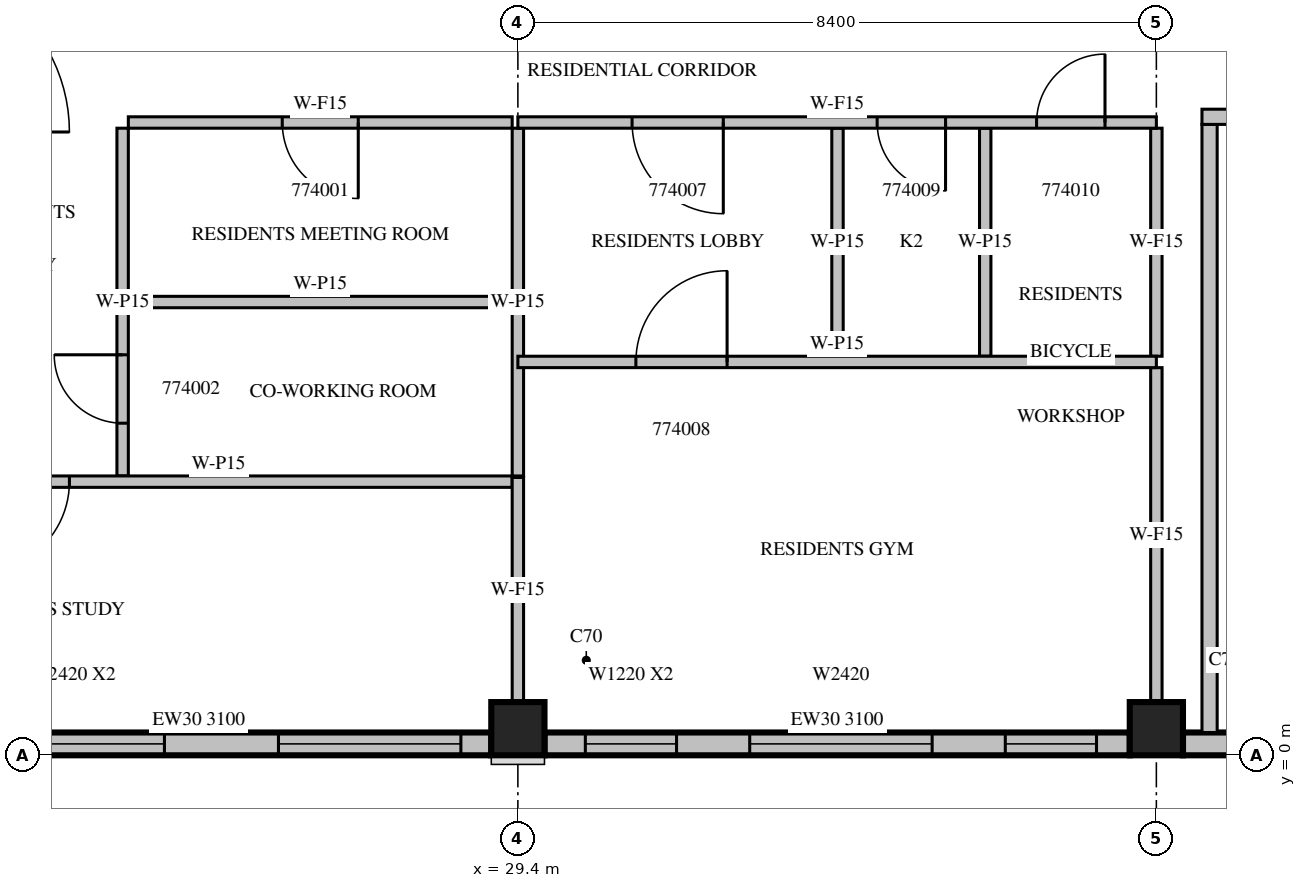
"""IFC4 building model, lengths in metres.
Left out: names, types, materials, properties, quantities, classifications, styles, units other than length and angle.
Written with IfcOpenShell. Run it as: python <this file> out.ifc"""

import sys

from ifc_helpers import new_model, si_unit, direction, frame, frame_2d, origin, origin_2d, place, context, subcontext, project, spatial, rectangle, extrude, source, transform, mapped, element, fill, save


model = new_model("IFC4")
c1 = context("Model", 3, precision=1e-05, world=origin(), true_north=direction((0.0, 1.0)))
c2 = subcontext(c1, "Body", "Model", "MODEL_VIEW")
j1 = project(units=[si_unit("LENGTHUNIT", "METRE"), si_unit("PLANEANGLEUNIT", "RADIAN")], contexts=[c1])
p1 = place(None, origin())
s1 = spatial("IfcSite", under=j1, at=p1, CompositionType="ELEMENT")
p2 = place(p1, origin())
s2 = spatial("IfcBuilding", under=s1, at=p2, CompositionType="ELEMENT")
p3 = place(p2, frame((0.0, 0.0, 319.5)))
s3 = spatial("IfcBuildingStorey", under=s2, at=p3, CompositionType="ELEMENT", Elevation=319.5)
m1 = source(origin(), c2, "Body", "SweptSolid", [
    extrude(rectangle(XDim=0.7, YDim=0.7, at=origin_2d()), origin(), (0.0, 0.0, 1.0), 3.5),
])
for number, where, z_axis, x_axis in (
    (1, (29.4, 0.35, 0.0), (0.0, 0.0, 1.0), (1.0, 0.0, 0.0)),
    (2, (37.8, 0.35, 0.0), (0.0, 0.0, 1.0), (1.0, 0.0, 0.0)),
):
    element("IfcColumn", number, at=place(p3, frame(where, z_axis=z_axis, x_axis=x_axis)), inside=s3, PredefinedType="COLUMN", context=c2, shape_type="MappedRepresentation", body=[
        mapped(m1, transform((0.0, 0.0, 0.0), scale=1.0)),
    ])
m2 = source(origin(), c2, "Body", "SweptSolid", [
    extrude(rectangle(XDim=7.7, YDim=0.3, at=frame_2d((3.85, 0.0))), origin(), (0.0, 0.0, 1.0), 3.1),
])
p4 = place(p3, frame((21.35, 0.15, 0.0), z_axis=(0.0, 0.0, 1.0), x_axis=(1.0, 0.0, 0.0)))
e3 = element("IfcWall", 3, at=p4, inside=s3, PredefinedType="STANDARD", context=c2, shape_type="MappedRepresentation", body=[
    mapped(m2, transform((0.0, 0.0, 0.0), scale=1.0)),
])
m3 = source(origin(), c2, "Body", "SweptSolid", [
    extrude(rectangle(XDim=2.4, YDim=2.0, at=frame_2d((1.2, 1.0))), frame((0.0, 0.16, 0.0), z_axis=(0.0, -1.0, 0.0), x_axis=(1.0, 0.0, 0.0)), (0.0, 0.0, 1.0), 0.32),
])
p5 = place(p4, frame((1.0, 0.0, 0.6)))
e4 = element("IfcOpeningElement", 4, at=p5, cuts=e3, PredefinedType="OPENING", context=c2, shape_type="MappedRepresentation", body=[
    mapped(m3, transform((0.0, 0.0, 0.0), scale=1.0)),
])
p6 = place(p4, frame((4.9, 0.0, 0.6)))
e5 = element("IfcOpeningElement", 5, at=p6, cuts=e3, PredefinedType="OPENING", context=c2, shape_type="MappedRepresentation", body=[
    mapped(m3, transform((0.0, 0.0, 0.0), scale=1.0)),
])
p7 = place(p3, frame((29.75, 0.15, 0.0), z_axis=(0.0, 0.0, 1.0), x_axis=(1.0, 0.0, 0.0)))
e6 = element("IfcWall", 6, at=p7, inside=s3, PredefinedType="STANDARD", context=c2, shape_type="MappedRepresentation", body=[
    mapped(m2, transform((0.0, 0.0, 0.0), scale=1.0)),
])
m4 = source(origin(), c2, "Body", "SweptSolid", [
    extrude(rectangle(XDim=1.2, YDim=2.0, at=frame_2d((0.6, 1.0))), frame((0.0, 0.16, 0.0), z_axis=(0.0, -1.0, 0.0), x_axis=(1.0, 0.0, 0.0)), (0.0, 0.0, 1.0), 0.32),
])
p8 = place(p7, frame((0.537, 0.0, 0.6)))
e7 = element("IfcOpeningElement", 7, at=p8, cuts=e6, PredefinedType="OPENING", context=c2, shape_type="MappedRepresentation", body=[
    mapped(m4, transform((0.0, 0.0, 0.0), scale=1.0)),
])
p9 = place(p7, frame((6.062, 0.0, 0.6)))
e8 = element("IfcOpeningElement", 8, at=p9, cuts=e6, PredefinedType="OPENING", context=c2, shape_type="MappedRepresentation", body=[
    mapped(m4, transform((0.0, 0.0, 0.0), scale=1.0)),
])
p10 = place(p7, frame((2.7, 0.0, 0.6)))
e9 = element("IfcOpeningElement", 9, at=p10, cuts=e6, PredefinedType="OPENING", context=c2, shape_type="MappedRepresentation", body=[
    mapped(m3, transform((0.0, 0.0, 0.0), scale=1.0)),
])
m5 = source(origin(), c2, "Body", "SweptSolid", [
    extrude(rectangle(XDim=2.05, YDim=0.3, at=frame_2d((1.025, 0.0))), origin(), (0.0, 0.0, 1.0), 3.1),
])
p11 = place(p3, frame((38.15, 0.15, 0.0), z_axis=(0.0, 0.0, 1.0), x_axis=(1.0, 0.0, 0.0)))
e10 = element("IfcWall", 10, at=p11, inside=s3, PredefinedType="STANDARD", context=c2, shape_type="MappedRepresentation", body=[
    mapped(m5, transform((0.0, 0.0, 0.0), scale=1.0)),
])
m6 = source(origin(), c2, "Body", "SweptSolid", [
    extrude(rectangle(XDim=8.0, YDim=0.2, at=frame_2d((4.0, 0.0))), origin(), (0.0, 0.0, 1.0), 3.1),
])
p12 = place(p3, frame((38.5, 0.3, 0.0), z_axis=(0.0, 0.0, 1.0), x_axis=(0.0, 1.0, 0.0)))
e11 = element("IfcWall", 11, at=p12, inside=s3, PredefinedType="PARTITIONING", context=c2, shape_type="MappedRepresentation", body=[
    mapped(m6, transform((0.0, 0.0, 0.0), scale=1.0)),
])
m7 = source(origin(), c2, "Body", "SweptSolid", [
    extrude(rectangle(XDim=5.45, YDim=0.2, at=frame_2d((2.725, 0.0))), origin(), (0.0, 0.0, 1.0), 3.1),
])
p13 = place(p3, frame((38.4, 8.4, 0.0), z_axis=(0.0, 0.0, 1.0), x_axis=(1.0, 0.0, 0.0)))
e12 = element("IfcWall", 12, at=p13, inside=s3, PredefinedType="PARTITIONING", context=c2, shape_type="MappedRepresentation", body=[
    mapped(m7, transform((0.0, 0.0, 0.0), scale=1.0)),
])
m8 = source(origin(), c2, "Body", "SweptSolid", [
    extrude(rectangle(XDim=1.2, YDim=2.1, at=frame_2d((0.6, 1.05))), frame((0.0, 0.11, 0.0), z_axis=(0.0, -1.0, 0.0), x_axis=(1.0, 0.0, 0.0)), (0.0, 0.0, 1.0), 0.22),
])
p14 = place(p13, frame((0.4, 0.0, 0.0)))
e13 = element("IfcOpeningElement", 13, at=p14, cuts=e12, PredefinedType="OPENING", context=c2, shape_type="MappedRepresentation", body=[
    mapped(m8, transform((0.0, 0.0, 0.0), scale=1.0)),
])
m9 = source(origin(), c2, "Body", "SweptSolid", [
    extrude(rectangle(XDim=0.9, YDim=2.1, at=frame_2d((0.45, 1.05))), frame((0.0, 0.11, 0.0), z_axis=(0.0, -1.0, 0.0), x_axis=(1.0, 0.0, 0.0)), (0.0, 0.0, 1.0), 0.22),
])
p15 = place(p13, frame((3.25, 0.0, 0.0)))
e14 = element("IfcOpeningElement", 14, at=p15, cuts=e12, PredefinedType="OPENING", context=c2, shape_type="MappedRepresentation", body=[
    mapped(m9, transform((0.0, 0.0, 0.0), scale=1.0)),
])
m10 = source(origin(), c2, "Body", "SweptSolid", [
    extrude(rectangle(XDim=4.575, YDim=0.15, at=frame_2d((2.288, 0.0))), origin(), (0.0, 0.0, 1.0), 3.1),
])
p16 = place(p3, frame((24.2, 8.25, 0.0), z_axis=(0.0, 0.0, 1.0), x_axis=(0.0, -1.0, 0.0)))
e15 = element("IfcWall", 15, at=p16, inside=s3, PredefinedType="PARTITIONING", context=c2, shape_type="MappedRepresentation", body=[
    mapped(m10, transform((0.0, 0.0, 0.0), scale=1.0)),
])
m11 = source(origin(), c2, "Body", "SweptSolid", [
    extrude(rectangle(XDim=0.9, YDim=2.1, at=frame_2d((0.45, 1.05))), frame((0.0, 0.085, 0.0), z_axis=(0.0, -1.0, 0.0), x_axis=(1.0, 0.0, 0.0)), (0.0, 0.0, 1.0), 0.17),
])
p17 = place(p16, frame((2.981, 0.0, 0.0)))
e16 = element("IfcOpeningElement", 16, at=p17, cuts=e15, PredefinedType="OPENING", context=c2, shape_type="MappedRepresentation", body=[
    mapped(m11, transform((0.0, 0.0, 0.0), scale=1.0)),
])
p18 = place(p3, frame((29.4, 3.675, 0.0), z_axis=(0.0, 0.0, 1.0), x_axis=(0.0, 1.0, 0.0)))
e17 = element("IfcWall", 17, at=p18, inside=s3, PredefinedType="PARTITIONING", context=c2, shape_type="MappedRepresentation", body=[
    mapped(m10, transform((0.0, 0.0, 0.0), scale=1.0)),
])
m12 = source(origin(), c2, "Body", "SweptSolid", [
    extrude(rectangle(XDim=5.05, YDim=0.15, at=frame_2d((2.525, 0.0))), origin(), (0.0, 0.0, 1.0), 3.1),
])
p19 = place(p3, frame((29.325, 8.325, 0.0), z_axis=(0.0, 0.0, 1.0), x_axis=(-1.0, 0.0, 0.0)))
e18 = element("IfcWall", 18, at=p19, inside=s3, PredefinedType="PARTITIONING", context=c2, shape_type="MappedRepresentation", body=[
    mapped(m12, transform((0.0, 0.0, 0.0), scale=1.0)),
])
m13 = source(origin(), c2, "Body", "SweptSolid", [
    extrude(rectangle(XDim=1.0, YDim=2.1, at=frame_2d((0.5, 1.05))), frame((0.0, 0.085, 0.0), z_axis=(0.0, -1.0, 0.0), x_axis=(1.0, 0.0, 0.0)), (0.0, 0.0, 1.0), 0.17),
])
p20 = place(p19, frame((2.025, 0.0, 0.0)))
e19 = element("IfcOpeningElement", 19, at=p20, cuts=e18, PredefinedType="OPENING", context=c2, shape_type="MappedRepresentation", body=[
    mapped(m13, transform((0.0, 0.0, 0.0), scale=1.0)),
])
p21 = place(p3, frame((29.325, 5.963, 0.0), z_axis=(0.0, 0.0, 1.0), x_axis=(-1.0, 0.0, 0.0)))
e20 = element("IfcWall", 20, at=p21, inside=s3, PredefinedType="PARTITIONING", context=c2, shape_type="MappedRepresentation", body=[
    mapped(m12, transform((0.0, 0.0, 0.0), scale=1.0)),
])
m14 = source(origin(), c2, "Body", "SweptSolid", [
    extrude(rectangle(XDim=7.725, YDim=0.15, at=frame_2d((3.862, 0.0))), origin(), (0.0, 0.0, 1.0), 3.1),
])
p22 = place(p3, frame((21.6, 3.6, 0.0), z_axis=(0.0, 0.0, 1.0), x_axis=(1.0, 0.0, 0.0)))
e21 = element("IfcWall", 21, at=p22, inside=s3, PredefinedType="PARTITIONING", context=c2, shape_type="MappedRepresentation", body=[
    mapped(m14, transform((0.0, 0.0, 0.0), scale=1.0)),
])
m15 = source(origin(), c2, "Body", "SweptSolid", [
    extrude(rectangle(XDim=1.2, YDim=2.1, at=frame_2d((0.6, 1.05))), frame((0.0, 0.085, 0.0), z_axis=(0.0, -1.0, 0.0), x_axis=(1.0, 0.0, 0.0)), (0.0, 0.0, 1.0), 0.17),
])
p23 = place(p22, frame((0.7, 0.0, 0.0)))
e22 = element("IfcOpeningElement", 22, at=p23, cuts=e21, PredefinedType="OPENING", context=c2, shape_type="MappedRepresentation", body=[
    mapped(m15, transform((0.0, 0.0, 0.0), scale=1.0)),
])
m16 = source(origin(), c2, "Body", "SweptSolid", [
    extrude(rectangle(XDim=3.0, YDim=0.15, at=frame_2d((1.5, 0.0))), origin(), (0.0, 0.0, 1.0), 3.1),
])
for number, where, z_axis, x_axis in (
    (23, (33.605, 5.25, 0.0), (0.0, 0.0, 1.0), (0.0, 1.0, 0.0)),
    (24, (35.548, 5.25, 0.0), (0.0, 0.0, 1.0), (0.0, 1.0, 0.0)),
):
    element("IfcWall", number, at=place(p3, frame(where, z_axis=z_axis, x_axis=x_axis)), inside=s3, PredefinedType="PARTITIONING", context=c2, shape_type="MappedRepresentation", body=[
        mapped(m16, transform((0.0, 0.0, 0.0), scale=1.0)),
    ])
m17 = source(origin(), c2, "Body", "SweptSolid", [
    extrude(rectangle(XDim=2.956, YDim=0.15, at=frame_2d((1.478, 0.0))), origin(), (0.0, 0.0, 1.0), 3.1),
])
p24 = place(p3, frame((29.4, 0.699, 0.0), z_axis=(0.0, 0.0, 1.0), x_axis=(0.0, 1.0, 0.0)))
e25 = element("IfcWall", 25, at=p24, inside=s3, PredefinedType="PARTITIONING", context=c2, shape_type="MappedRepresentation", body=[
    mapped(m17, transform((0.0, 0.0, 0.0), scale=1.0)),
])
m18 = source(origin(), c2, "Body", "SweptSolid", [
    extrude(rectangle(XDim=4.401, YDim=0.15, at=frame_2d((2.2, 0.0))), origin(), (0.0, 0.0, 1.0), 3.1),
])
p25 = place(p3, frame((37.8, 0.699, 0.0), z_axis=(0.0, 0.0, 1.0), x_axis=(0.0, 1.0, 0.0)))
e26 = element("IfcWall", 26, at=p25, inside=s3, PredefinedType="PARTITIONING", context=c2, shape_type="MappedRepresentation", body=[
    mapped(m18, transform((0.0, 0.0, 0.0), scale=1.0)),
])
p26 = place(p3, frame((37.8, 5.25, 0.0), z_axis=(0.0, 0.0, 1.0), x_axis=(0.0, 1.0, 0.0)))
e27 = element("IfcWall", 27, at=p26, inside=s3, PredefinedType="PARTITIONING", context=c2, shape_type="MappedRepresentation", body=[
    mapped(m16, transform((0.0, 0.0, 0.0), scale=1.0)),
])
m19 = source(origin(), c2, "Body", "SweptSolid", [
    extrude(rectangle(XDim=8.4, YDim=0.15, at=frame_2d((4.2, 0.0))), origin(), (0.0, 0.0, 1.0), 3.1),
])
p27 = place(p3, frame((37.8, 5.175, 0.0), z_axis=(0.0, 0.0, 1.0), x_axis=(-1.0, 0.0, 0.0)))
e28 = element("IfcWall", 28, at=p27, inside=s3, PredefinedType="PARTITIONING", context=c2, shape_type="MappedRepresentation", body=[
    mapped(m19, transform((0.0, 0.0, 0.0), scale=1.0)),
])
p28 = place(p27, frame((5.648, 0.0, 0.0)))
e29 = element("IfcOpeningElement", 29, at=p28, cuts=e28, PredefinedType="OPENING", context=c2, shape_type="MappedRepresentation", body=[
    mapped(m15, transform((0.0, 0.0, 0.0), scale=1.0)),
])
p29 = place(p3, frame((37.8, 8.325, 0.0), z_axis=(0.0, 0.0, 1.0), x_axis=(-1.0, 0.0, 0.0)))
e30 = element("IfcWall", 30, at=p29, inside=s3, PredefinedType="PARTITIONING", context=c2, shape_type="MappedRepresentation", body=[
    mapped(m19, transform((0.0, 0.0, 0.0), scale=1.0)),
])
p30 = place(p29, frame((5.698, 0.0, 0.0)))
e31 = element("IfcOpeningElement", 31, at=p30, cuts=e30, PredefinedType="OPENING", context=c2, shape_type="MappedRepresentation", body=[
    mapped(m15, transform((0.0, 0.0, 0.0), scale=1.0)),
])
p31 = place(p29, frame((2.773, 0.0, 0.0)))
e32 = element("IfcOpeningElement", 32, at=p31, cuts=e30, PredefinedType="OPENING", context=c2, shape_type="MappedRepresentation", body=[
    mapped(m11, transform((0.0, 0.0, 0.0), scale=1.0)),
])
p32 = place(p29, frame((0.676, 0.0, 0.0)))
e33 = element("IfcOpeningElement", 33, at=p32, cuts=e30, PredefinedType="OPENING", context=c2, shape_type="MappedRepresentation", body=[
    mapped(m11, transform((0.0, 0.0, 0.0), scale=1.0)),
])
m20 = source(origin(), c2, "Body", "SweptSolid", [
    extrude(rectangle(XDim=2.4, YDim=2.0, at=frame_2d((1.2, 1.0))), frame((0.0, 0.03, 0.0), z_axis=(0.0, -1.0, 0.0), x_axis=(1.0, 0.0, 0.0)), (0.0, 0.0, 1.0), 0.06),
])
p33 = place(p5, origin())
e34 = element("IfcWindow", 34, at=p33, inside=s3, PartitioningType="SINGLE_PANEL", PredefinedType="WINDOW", context=c2, shape_type="MappedRepresentation", body=[
    mapped(m20, transform((0.0, 0.0, 0.0), scale=1.0)),
])
fill(e4, e34)
p34 = place(p6, origin())
e35 = element("IfcWindow", 35, at=p34, inside=s3, PartitioningType="SINGLE_PANEL", PredefinedType="WINDOW", context=c2, shape_type="MappedRepresentation", body=[
    mapped(m20, transform((0.0, 0.0, 0.0), scale=1.0)),
])
fill(e5, e35)
m21 = source(origin(), c2, "Body", "SweptSolid", [
    extrude(rectangle(XDim=1.2, YDim=2.0, at=frame_2d((0.6, 1.0))), frame((0.0, 0.03, 0.0), z_axis=(0.0, -1.0, 0.0), x_axis=(1.0, 0.0, 0.0)), (0.0, 0.0, 1.0), 0.06),
])
p35 = place(p8, origin())
e36 = element("IfcWindow", 36, at=p35, inside=s3, PartitioningType="SINGLE_PANEL", PredefinedType="WINDOW", context=c2, shape_type="MappedRepresentation", body=[
    mapped(m21, transform((0.0, 0.0, 0.0), scale=1.0)),
])
fill(e7, e36)
p36 = place(p9, origin())
e37 = element("IfcWindow", 37, at=p36, inside=s3, PartitioningType="SINGLE_PANEL", PredefinedType="WINDOW", context=c2, shape_type="MappedRepresentation", body=[
    mapped(m21, transform((0.0, 0.0, 0.0), scale=1.0)),
])
fill(e8, e37)
p37 = place(p10, origin())
e38 = element("IfcWindow", 38, at=p37, inside=s3, PartitioningType="SINGLE_PANEL", PredefinedType="WINDOW", context=c2, shape_type="MappedRepresentation", body=[
    mapped(m20, transform((0.0, 0.0, 0.0), scale=1.0)),
])
fill(e9, e38)
m22 = source(origin(), c2, "Body", "SweptSolid", [
    extrude(rectangle(XDim=1.0, YDim=2.1, at=frame_2d((0.5, 1.05))), frame((0.0, 0.025, 0.0), z_axis=(0.0, -1.0, 0.0), x_axis=(1.0, 0.0, 0.0)), (0.0, 0.0, 1.0), 0.05),
])
p38 = place(p20, origin())
e39 = element("IfcDoor", 39, at=p38, inside=s3, OperationType="SINGLE_SWING_LEFT", PredefinedType="DOOR", context=c2, shape_type="MappedRepresentation", body=[
    mapped(m22, transform((0.0, 0.0, 0.0), scale=1.0)),
])
fill(e19, e39)
m23 = source(origin(), c2, "Body", "SweptSolid", [
    extrude(rectangle(XDim=0.9, YDim=2.1, at=frame_2d((0.45, 1.05))), frame((0.0, 0.025, 0.0), z_axis=(0.0, -1.0, 0.0), x_axis=(1.0, 0.0, 0.0)), (0.0, 0.0, 1.0), 0.05),
])
p39 = place(p17, origin())
e40 = element("IfcDoor", 40, at=p39, inside=s3, OperationType="SINGLE_SWING_RIGHT", PredefinedType="DOOR", context=c2, shape_type="MappedRepresentation", body=[
    mapped(m23, transform((0.0, 0.0, 0.0), scale=1.0)),
])
fill(e16, e40)
m24 = source(origin(), c2, "Body", "SweptSolid", [
    extrude(rectangle(XDim=1.2, YDim=2.1, at=frame_2d((0.6, 1.05))), frame((0.0, 0.025, 0.0), z_axis=(0.0, -1.0, 0.0), x_axis=(1.0, 0.0, 0.0)), (0.0, 0.0, 1.0), 0.05),
])
p40 = place(p23, origin())
e41 = element("IfcDoor", 41, at=p40, inside=s3, OperationType="SINGLE_SWING_RIGHT", PredefinedType="DOOR", context=c2, shape_type="MappedRepresentation", body=[
    mapped(m24, transform((0.0, 0.0, 0.0), scale=1.0)),
])
fill(e22, e41)
p41 = place(p30, origin())
e42 = element("IfcDoor", 42, at=p41, inside=s3, OperationType="SINGLE_SWING_LEFT", PredefinedType="DOOR", context=c2, shape_type="MappedRepresentation", body=[
    mapped(m24, transform((0.0, 0.0, 0.0), scale=1.0)),
])
fill(e31, e42)
p42 = place(p28, origin())
e43 = element("IfcDoor", 43, at=p42, inside=s3, OperationType="SINGLE_SWING_RIGHT", PredefinedType="DOOR", context=c2, shape_type="MappedRepresentation", body=[
    mapped(m24, transform((0.0, 0.0, 0.0), scale=1.0)),
])
fill(e29, e43)
p43 = place(p31, origin())
e44 = element("IfcDoor", 44, at=p43, inside=s3, OperationType="SINGLE_SWING_LEFT", PredefinedType="DOOR", context=c2, shape_type="MappedRepresentation", body=[
    mapped(m23, transform((0.0, 0.0, 0.0), scale=1.0)),
])
fill(e32, e44)
p44 = place(p32, origin())
e45 = element("IfcDoor", 45, at=p44, inside=s3, OperationType="SINGLE_SWING_RIGHT", PredefinedType="DOOR", context=c2, shape_type="MappedRepresentation", body=[
    mapped(m23, transform((0.0, 0.0, 0.0), scale=1.0)),
])
fill(e33, e45)
save(model, sys.argv[1])
